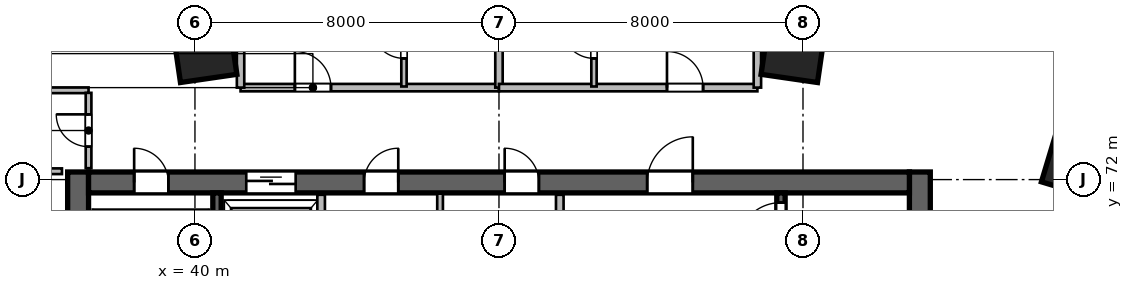
"""IFC4 building model, lengths in metres.
Left out: names, types, materials, properties, quantities, classifications, styles, units other than length and angle.
Written with IfcOpenShell. Run it as: python <this file> out.ifc"""

import sys

from ifc_helpers import new_model, si_unit, direction, frame, frame_2d, origin, origin_2d, place, context, subcontext, project, spatial, rectangle, extrude, source, transform, mapped, element, fill, save


model = new_model("IFC4")
c1 = context("Model", 3, precision=1e-05, world=origin(), true_north=direction((0.0, 1.0)))
c2 = subcontext(c1, "Body", "Model", "MODEL_VIEW")
j1 = project(units=[si_unit("LENGTHUNIT", "METRE"), si_unit("PLANEANGLEUNIT", "RADIAN")], contexts=[c1])
p1 = place(None, origin())
s1 = spatial("IfcSite", under=j1, at=p1, CompositionType="ELEMENT")
p2 = place(p1, origin())
s2 = spatial("IfcBuilding", under=s1, at=p2, CompositionType="ELEMENT")
p3 = place(p2, frame((0.0, 0.0, 71.4)))
s3 = spatial("IfcBuildingStorey", under=s2, at=p3, CompositionType="ELEMENT", Elevation=71.4)
m1 = source(origin(), c2, "Body", "SweptSolid", [
    extrude(rectangle(XDim=12.0, YDim=0.55, at=frame_2d((6.0, 0.0))), origin(), (0.0, 0.0, 1.0), 3.6),
])
for number, where, z_axis, x_axis in (
    (1, (36.925, 60.2, 0.0), (0.0, 0.0, 1.0), (0.0, 1.0, 0.0)),
    (2, (59.075, 60.2, 0.0), (0.0, 0.0, 1.0), (0.0, 1.0, 0.0)),
):
    element("IfcWall", number, at=place(p3, frame(where, z_axis=z_axis, x_axis=x_axis)), inside=s3, PredefinedType="SHEAR", context=c2, shape_type="MappedRepresentation", body=[
        mapped(m1, transform((0.0, 0.0, 0.0), scale=1.0)),
    ])
m2 = source(origin(), c2, "Body", "SweptSolid", [
    extrude(rectangle(XDim=21.6, YDim=0.55, at=frame_2d((10.8, 0.0))), origin(), (0.0, 0.0, 1.0), 3.6),
])
p4 = place(p3, frame((37.2, 71.925, 0.0), z_axis=(0.0, 0.0, 1.0), x_axis=(1.0, 0.0, 0.0)))
e3 = element("IfcWall", 3, at=p4, inside=s3, PredefinedType="SHEAR", context=c2, shape_type="MappedRepresentation", body=[
    mapped(m2, transform((0.0, 0.0, 0.0), scale=1.0)),
])
p5 = place(p4, frame((1.2, 0.0, 0.0)))
e4 = element("IfcOpeningElement", 4, at=p5, cuts=e3, PredefinedType="OPENING", context=c2, shape_type="SweptSolid", body=[
    extrude(rectangle(XDim=0.9, YDim=2.1, at=frame_2d((0.45, 1.05))), frame((0.0, 0.285, 0.0), z_axis=(0.0, -1.0, 0.0), x_axis=(1.0, 0.0, 0.0)), (0.0, 0.0, 1.0), 0.57),
])
p6 = place(p4, frame((14.7, 0.0, 0.0)))
e5 = element("IfcOpeningElement", 5, at=p6, cuts=e3, PredefinedType="OPENING", context=c2, shape_type="SweptSolid", body=[
    extrude(rectangle(XDim=1.2, YDim=2.15, at=frame_2d((0.6, 1.075))), frame((0.0, 0.285, 0.0), z_axis=(0.0, -1.0, 0.0), x_axis=(1.0, 0.0, 0.0)), (0.0, 0.0, 1.0), 0.57),
])
p7 = place(p4, frame((4.15, 0.0, 0.0)))
e6 = element("IfcOpeningElement", 6, at=p7, cuts=e3, PredefinedType="OPENING", context=c2, shape_type="SweptSolid", body=[
    extrude(rectangle(XDim=1.3, YDim=2.15, at=frame_2d((0.65, 1.075))), frame((0.0, 0.285, 0.0), z_axis=(0.0, -1.0, 0.0), x_axis=(1.0, 0.0, 0.0)), (0.0, 0.0, 1.0), 0.57),
])
p8 = place(p4, frame((7.25, 0.0, 0.0)))
e7 = element("IfcOpeningElement", 7, at=p8, cuts=e3, PredefinedType="OPENING", context=c2, shape_type="SweptSolid", body=[
    extrude(rectangle(XDim=0.9, YDim=2.1, at=frame_2d((0.45, 1.05))), frame((0.0, 0.285, 0.0), z_axis=(0.0, -1.0, 0.0), x_axis=(1.0, 0.0, 0.0)), (0.0, 0.0, 1.0), 0.57),
])
p9 = place(p4, frame((10.95, 0.0, 0.0)))
e8 = element("IfcOpeningElement", 8, at=p9, cuts=e3, PredefinedType="OPENING", context=c2, shape_type="SweptSolid", body=[
    extrude(rectangle(XDim=0.9, YDim=2.1, at=frame_2d((0.45, 1.05))), frame((0.0, 0.285, 0.0), z_axis=(0.0, -1.0, 0.0), x_axis=(1.0, 0.0, 0.0)), (0.0, 0.0, 1.0), 0.57),
])
m3 = source(origin(), c2, "Body", "SweptSolid", [
    extrude(rectangle(XDim=10.9, YDim=0.22, at=frame_2d((5.45, 0.0))), origin(), (0.0, 0.0, 1.0), 3.6),
])
p10 = place(p3, frame((40.58, 60.75, 0.0), z_axis=(0.0, 0.0, 1.0), x_axis=(0.0, 1.0, 0.0)))
e9 = element("IfcWall", 9, at=p10, inside=s3, PredefinedType="SHEAR", context=c2, shape_type="MappedRepresentation", body=[
    mapped(m3, transform((0.0, 0.0, 0.0), scale=1.0)),
])
p11 = place(p3, frame((55.42, 60.75, 0.0), z_axis=(0.0, 0.0, 1.0), x_axis=(0.0, 1.0, 0.0)))
e10 = element("IfcWall", 10, at=p11, inside=s3, PredefinedType="SHEAR", context=c2, shape_type="MappedRepresentation", body=[
    mapped(m3, transform((0.0, 0.0, 0.0), scale=1.0)),
])
p12 = place(p11, frame((9.495, 0.0, 0.0)))
e11 = element("IfcOpeningElement", 11, at=p12, cuts=e10, PredefinedType="OPENING", context=c2, shape_type="SweptSolid", body=[
    extrude(rectangle(XDim=1.15, YDim=2.15, at=frame_2d((0.575, 1.075))), frame((0.0, 0.12, 0.0), z_axis=(0.0, -1.0, 0.0), x_axis=(1.0, 0.0, 0.0)), (0.0, 0.0, 1.0), 0.24),
])
m4 = source(origin(), c2, "Body", "SweptSolid", [
    extrude(rectangle(XDim=1.5, YDim=1.5, at=origin_2d()), origin(), (0.0, 0.0, 1.0), 3.6),
])
for number, where, z_axis, x_axis in (
    (12, (40.253, 75.404, 0.0), (0.0, 0.0, 1.0), (-0.143, 0.99, 0.0)),
    (13, (55.747, 75.404, 0.0), (0.0, 0.0, 1.0), (0.143, 0.99, 0.0)),
    (14, (63.209, 72.442, 0.0), (0.0, 0.0, 1.0), (0.289, 0.957, 0.0)),
):
    element("IfcColumn", number, at=place(p3, frame(where, z_axis=z_axis, x_axis=x_axis)), inside=s3, PredefinedType="COLUMN", context=c2, shape_type="MappedRepresentation", body=[
        mapped(m4, transform((0.0, 0.0, 0.0), scale=1.0)),
    ])
m5 = source(origin(), c2, "Body", "SweptSolid", [
    extrude(rectangle(XDim=5.8, YDim=0.2, at=frame_2d((2.9, 0.0))), origin(), (0.0, 0.0, 1.0), 3.36),
])
p13 = place(p3, frame((49.6, 65.8, 0.0), z_axis=(0.0, 0.0, 1.0), x_axis=(0.0, 1.0, 0.0)))
e15 = element("IfcWall", 15, at=p13, inside=s3, PredefinedType="SOLIDWALL", context=c2, shape_type="MappedRepresentation", body=[
    mapped(m5, transform((0.0, 0.0, 0.0), scale=1.0)),
])
m6 = source(origin(), c2, "Body", "SweptSolid", [
    extrude(rectangle(XDim=3.2, YDim=0.2, at=frame_2d((1.6, 0.0))), origin(), (0.0, 0.0, 1.0), 3.36),
])
p14 = place(p3, frame((43.32, 68.4, 0.0), z_axis=(0.0, 0.0, 1.0), x_axis=(0.0, 1.0, 0.0)))
e16 = element("IfcWall", 16, at=p14, inside=s3, PredefinedType="SOLIDWALL", context=c2, shape_type="MappedRepresentation", body=[
    mapped(m6, transform((0.0, 0.0, 0.0), scale=1.0)),
])
m7 = source(origin(), c2, "Body", "SweptSolid", [
    extrude(rectangle(XDim=3.23, YDim=0.15, at=frame_2d((1.615, 0.0))), origin(), (0.0, 0.0, 1.0), 3.36),
])
p15 = place(p3, frame((46.45, 68.4, 0.0), z_axis=(0.0, 0.0, 1.0), x_axis=(0.0, 1.0, 0.0)))
e17 = element("IfcWall", 17, at=p15, inside=s3, PredefinedType="PARTITIONING", context=c2, shape_type="MappedRepresentation", body=[
    mapped(m7, transform((0.0, 0.0, 0.0), scale=1.0)),
])
m8 = source(origin(), c2, "Body", "SweptSolid", [
    extrude(rectangle(XDim=2.1, YDim=0.15, at=frame_2d((1.05, 0.0))), origin(), (0.0, 0.0, 1.0), 3.36),
])
p16 = place(p3, frame((34.4, 72.22, 0.0), z_axis=(0.0, 0.0, 1.0), x_axis=(1.0, 0.0, 0.0)))
e18 = element("IfcWall", 18, at=p16, inside=s3, PredefinedType="PARTITIONING", context=c2, shape_type="MappedRepresentation", body=[
    mapped(m8, transform((0.0, 0.0, 0.0), scale=1.0)),
])
m9 = source(origin(), c2, "Body", "SweptSolid", [
    extrude(rectangle(XDim=2.8, YDim=0.15, at=frame_2d((1.4, 0.0))), origin(), (0.0, 0.0, 1.0), 3.36),
])
p17 = place(p3, frame((34.4, 74.35, 0.0), z_axis=(0.0, 0.0, 1.0), x_axis=(1.0, 0.0, 0.0)))
e19 = element("IfcWall", 19, at=p17, inside=s3, PredefinedType="PARTITIONING", context=c2, shape_type="MappedRepresentation", body=[
    mapped(m9, transform((0.0, 0.0, 0.0), scale=1.0)),
])
m10 = source(origin(), c2, "Body", "SweptSolid", [
    extrude(rectangle(XDim=1.982, YDim=0.15, at=frame_2d((0.991, 0.0))), origin(), (0.0, 0.0, 1.0), 3.36),
])
p18 = place(p3, frame((37.2, 72.3, 0.0), z_axis=(0.0, 0.0, 1.0), x_axis=(0.0, 1.0, 0.0)))
e20 = element("IfcWall", 20, at=p18, inside=s3, PredefinedType="PARTITIONING", context=c2, shape_type="MappedRepresentation", body=[
    mapped(m10, transform((0.0, 0.0, 0.0), scale=1.0)),
])
p19 = place(p18, frame((0.566, 0.0, 0.0)))
e21 = element("IfcOpeningElement", 21, at=p19, cuts=e20, PredefinedType="OPENING", context=c2, shape_type="SweptSolid", body=[
    extrude(rectangle(XDim=0.85, YDim=2.1, at=frame_2d((0.425, 1.05))), frame((0.0, 0.085, 0.0), z_axis=(0.0, -1.0, 0.0), x_axis=(1.0, 0.0, 0.0)), (0.0, 0.0, 1.0), 0.17),
])
m11 = source(origin(), c2, "Body", "SweptSolid", [
    extrude(rectangle(XDim=6.8, YDim=0.195, at=frame_2d((3.4, 0.0))), origin(), (0.0, 0.0, 1.0), 3.36),
])
p20 = place(p3, frame((41.2, 74.42, 0.0), z_axis=(0.0, 0.0, 1.0), x_axis=(1.0, 0.0, 0.0)))
e22 = element("IfcWall", 22, at=p20, inside=s3, PredefinedType="PARTITIONING", context=c2, shape_type="MappedRepresentation", body=[
    mapped(m11, transform((0.0, 0.0, 0.0), scale=1.0)),
])
p21 = place(p20, frame((1.429, 0.0, 0.0)))
e23 = element("IfcOpeningElement", 23, at=p21, cuts=e22, PredefinedType="OPENING", context=c2, shape_type="SweptSolid", body=[
    extrude(rectangle(XDim=0.95, YDim=2.15, at=frame_2d((0.475, 1.075))), frame((0.0, 0.107, 0.0), z_axis=(0.0, -1.0, 0.0), x_axis=(1.0, 0.0, 0.0)), (0.0, 0.0, 1.0), 0.215),
])
m12 = source(origin(), c2, "Body", "SweptSolid", [
    extrude(rectangle(XDim=6.216, YDim=0.195, at=frame_2d((3.108, 0.0))), origin(), (0.0, 0.0, 1.0), 2.644),
])
p22 = place(p3, frame((48.0, 74.42, 0.0), z_axis=(0.0, 0.0, 1.0), x_axis=(0.0, 1.0, 0.0)))
e24 = element("IfcWall", 24, at=p22, inside=s3, PredefinedType="PARTITIONING", context=c2, shape_type="MappedRepresentation", body=[
    mapped(m12, transform((0.0, 0.0, 0.0), scale=1.0)),
])
m13 = source(origin(), c2, "Body", "SweptSolid", [
    extrude(rectangle(XDim=5.426, YDim=0.195, at=frame_2d((2.713, 0.0))), origin(), (0.0, 0.0, 1.0), 3.36),
])
p23 = place(p3, frame((41.2, 74.42, 0.0), z_axis=(0.0, 0.0, 1.0), x_axis=(0.0, 1.0, 0.0)))
e25 = element("IfcWall", 25, at=p23, inside=s3, PredefinedType="PARTITIONING", context=c2, shape_type="MappedRepresentation", body=[
    mapped(m13, transform((0.0, 0.0, 0.0), scale=1.0)),
])
m14 = source(origin(), c2, "Body", "SweptSolid", [
    extrude(rectangle(XDim=2.33, YDim=0.14, at=frame_2d((1.165, 0.0))), origin(), (0.0, 0.0, 1.0), 3.36),
])
p24 = place(p3, frame((45.5, 74.45, 0.0), z_axis=(0.0, 0.0, 1.0), x_axis=(0.0, 1.0, 0.0)))
e26 = element("IfcWall", 26, at=p24, inside=s3, PredefinedType="PARTITIONING", context=c2, shape_type="MappedRepresentation", body=[
    mapped(m14, transform((0.0, 0.0, 0.0), scale=1.0)),
])
p25 = place(p24, frame((0.74, 0.0, 0.0)))
e27 = element("IfcOpeningElement", 27, at=p25, cuts=e26, PredefinedType="OPENING", context=c2, shape_type="SweptSolid", body=[
    extrude(rectangle(XDim=0.85, YDim=2.05, at=frame_2d((0.425, 1.025))), frame((0.0, 0.08, 0.0), z_axis=(0.0, -1.0, 0.0), x_axis=(1.0, 0.0, 0.0)), (0.0, 0.0, 1.0), 0.16),
])
p26 = place(p3, frame((48.0, 74.42, 0.0), z_axis=(0.0, 0.0, 1.0), x_axis=(1.0, 0.0, 0.0)))
e28 = element("IfcWall", 28, at=p26, inside=s3, PredefinedType="PARTITIONING", context=c2, shape_type="MappedRepresentation", body=[
    mapped(m11, transform((0.0, 0.0, 0.0), scale=1.0)),
])
p27 = place(p26, frame((4.421, 0.0, 0.0)))
e29 = element("IfcOpeningElement", 29, at=p27, cuts=e28, PredefinedType="OPENING", context=c2, shape_type="SweptSolid", body=[
    extrude(rectangle(XDim=0.95, YDim=2.15, at=frame_2d((0.475, 1.075))), frame((0.0, 0.107, 0.0), z_axis=(0.0, -1.0, 0.0), x_axis=(1.0, 0.0, 0.0)), (0.0, 0.0, 1.0), 0.215),
])
p28 = place(p3, frame((54.8, 74.42, 0.0), z_axis=(0.0, 0.0, 1.0), x_axis=(0.0, 1.0, 0.0)))
e30 = element("IfcWall", 30, at=p28, inside=s3, PredefinedType="PARTITIONING", context=c2, shape_type="MappedRepresentation", body=[
    mapped(m13, transform((0.0, 0.0, 0.0), scale=1.0)),
])
p29 = place(p3, frame((50.5, 74.45, 0.0), z_axis=(0.0, 0.0, 1.0), x_axis=(0.0, 1.0, 0.0)))
e31 = element("IfcWall", 31, at=p29, inside=s3, PredefinedType="PARTITIONING", context=c2, shape_type="MappedRepresentation", body=[
    mapped(m14, transform((0.0, 0.0, 0.0), scale=1.0)),
])
p30 = place(p29, frame((0.74, 0.0, 0.0)))
e32 = element("IfcOpeningElement", 32, at=p30, cuts=e31, PredefinedType="OPENING", context=c2, shape_type="SweptSolid", body=[
    extrude(rectangle(XDim=0.85, YDim=2.05, at=frame_2d((0.425, 1.025))), frame((0.0, 0.08, 0.0), z_axis=(0.0, -1.0, 0.0), x_axis=(1.0, 0.0, 0.0)), (0.0, 0.0, 1.0), 0.16),
])
m15 = source(origin(), c2, "Body", "SweptSolid", [
    extrude(rectangle(XDim=0.9, YDim=2.1, at=frame_2d((0.45, 1.05))), frame((0.0, 0.025, 0.0), z_axis=(0.0, -1.0, 0.0), x_axis=(1.0, 0.0, 0.0)), (0.0, 0.0, 1.0), 0.05),
])
p31 = place(p5, origin())
e33 = element("IfcDoor", 33, at=p31, inside=s3, OperationType="SINGLE_SWING_LEFT", PredefinedType="DOOR", context=c2, shape_type="MappedRepresentation", body=[
    mapped(m15, transform((0.0, 0.0, 0.0), scale=1.0)),
])
fill(e4, e33)
m16 = source(origin(), c2, "Body", "SweptSolid", [
    extrude(rectangle(XDim=1.15, YDim=2.15, at=frame_2d((0.575, 1.075))), frame((0.0, 0.025, 0.0), z_axis=(0.0, -1.0, 0.0), x_axis=(1.0, 0.0, 0.0)), (0.0, 0.0, 1.0), 0.05),
])
p32 = place(p12, origin())
e34 = element("IfcDoor", 34, at=p32, inside=s3, OperationType="SINGLE_SWING_LEFT", PredefinedType="DOOR", context=c2, shape_type="MappedRepresentation", body=[
    mapped(m16, transform((0.0, 0.0, 0.0), scale=1.0)),
])
fill(e11, e34)
m17 = source(origin(), c2, "Body", "SweptSolid", [
    extrude(rectangle(XDim=1.2, YDim=2.15, at=frame_2d((0.6, 1.075))), frame((0.0, 0.025, 0.0), z_axis=(0.0, -1.0, 0.0), x_axis=(1.0, 0.0, 0.0)), (0.0, 0.0, 1.0), 0.05),
])
p33 = place(p6, origin())
e35 = element("IfcDoor", 35, at=p33, inside=s3, OperationType="SINGLE_SWING_RIGHT", PredefinedType="DOOR", context=c2, shape_type="MappedRepresentation", body=[
    mapped(m17, transform((0.0, 0.0, 0.0), scale=1.0)),
])
fill(e5, e35)
m18 = source(origin(), c2, "Body", "SweptSolid", [
    extrude(rectangle(XDim=1.3, YDim=2.15, at=frame_2d((0.65, 1.075))), frame((0.0, 0.025, 0.0), z_axis=(0.0, -1.0, 0.0), x_axis=(1.0, 0.0, 0.0)), (0.0, 0.0, 1.0), 0.05),
])
p34 = place(p7, origin())
e36 = element("IfcDoor", 36, at=p34, inside=s3, OperationType="DOUBLE_DOOR_SLIDING", PredefinedType="DOOR", context=c2, shape_type="MappedRepresentation", body=[
    mapped(m18, transform((0.0, 0.0, 0.0), scale=1.0)),
])
fill(e6, e36)
p35 = place(p8, origin())
e37 = element("IfcDoor", 37, at=p35, inside=s3, OperationType="SINGLE_SWING_RIGHT", PredefinedType="DOOR", context=c2, shape_type="MappedRepresentation", body=[
    mapped(m15, transform((0.0, 0.0, 0.0), scale=1.0)),
])
fill(e7, e37)
p36 = place(p9, origin())
e38 = element("IfcDoor", 38, at=p36, inside=s3, OperationType="SINGLE_SWING_LEFT", PredefinedType="DOOR", context=c2, shape_type="MappedRepresentation", body=[
    mapped(m15, transform((0.0, 0.0, 0.0), scale=1.0)),
])
fill(e8, e38)
m19 = source(origin(), c2, "Body", "SweptSolid", [
    extrude(rectangle(XDim=0.85, YDim=2.1, at=frame_2d((0.425, 1.05))), frame((0.0, 0.025, 0.0), z_axis=(0.0, -1.0, 0.0), x_axis=(1.0, 0.0, 0.0)), (0.0, 0.0, 1.0), 0.05),
])
p37 = place(p19, origin())
e39 = element("IfcDoor", 39, at=p37, inside=s3, OperationType="SINGLE_SWING_RIGHT", PredefinedType="DOOR", context=c2, shape_type="MappedRepresentation", body=[
    mapped(m19, transform((0.0, 0.0, 0.0), scale=1.0)),
])
fill(e21, e39)
m20 = source(origin(), c2, "Body", "SweptSolid", [
    extrude(rectangle(XDim=0.95, YDim=2.15, at=frame_2d((0.475, 1.075))), frame((0.0, 0.025, 0.0), z_axis=(0.0, -1.0, 0.0), x_axis=(1.0, 0.0, 0.0)), (0.0, 0.0, 1.0), 0.05),
])
p38 = place(p21, origin())
e40 = element("IfcDoor", 40, at=p38, inside=s3, OperationType="SINGLE_SWING_LEFT", PredefinedType="DOOR", context=c2, shape_type="MappedRepresentation", body=[
    mapped(m20, transform((0.0, 0.0, 0.0), scale=1.0)),
])
fill(e23, e40)
m21 = source(origin(), c2, "Body", "SweptSolid", [
    extrude(rectangle(XDim=0.85, YDim=2.05, at=frame_2d((0.425, 1.025))), frame((0.0, 0.025, 0.0), z_axis=(0.0, -1.0, 0.0), x_axis=(1.0, 0.0, 0.0)), (0.0, 0.0, 1.0), 0.05),
])
p39 = place(p25, origin())
e41 = element("IfcDoor", 41, at=p39, inside=s3, OperationType="SINGLE_SWING_RIGHT", PredefinedType="DOOR", context=c2, shape_type="MappedRepresentation", body=[
    mapped(m21, transform((0.0, 0.0, 0.0), scale=1.0)),
])
fill(e27, e41)
p40 = place(p27, origin())
e42 = element("IfcDoor", 42, at=p40, inside=s3, OperationType="SINGLE_SWING_LEFT", PredefinedType="DOOR", context=c2, shape_type="MappedRepresentation", body=[
    mapped(m20, transform((0.0, 0.0, 0.0), scale=1.0)),
])
fill(e29, e42)
p41 = place(p30, origin())
e43 = element("IfcDoor", 43, at=p41, inside=s3, OperationType="SINGLE_SWING_RIGHT", PredefinedType="DOOR", context=c2, shape_type="MappedRepresentation", body=[
    mapped(m21, transform((0.0, 0.0, 0.0), scale=1.0)),
])
fill(e32, e43)
save(model, sys.argv[1])
